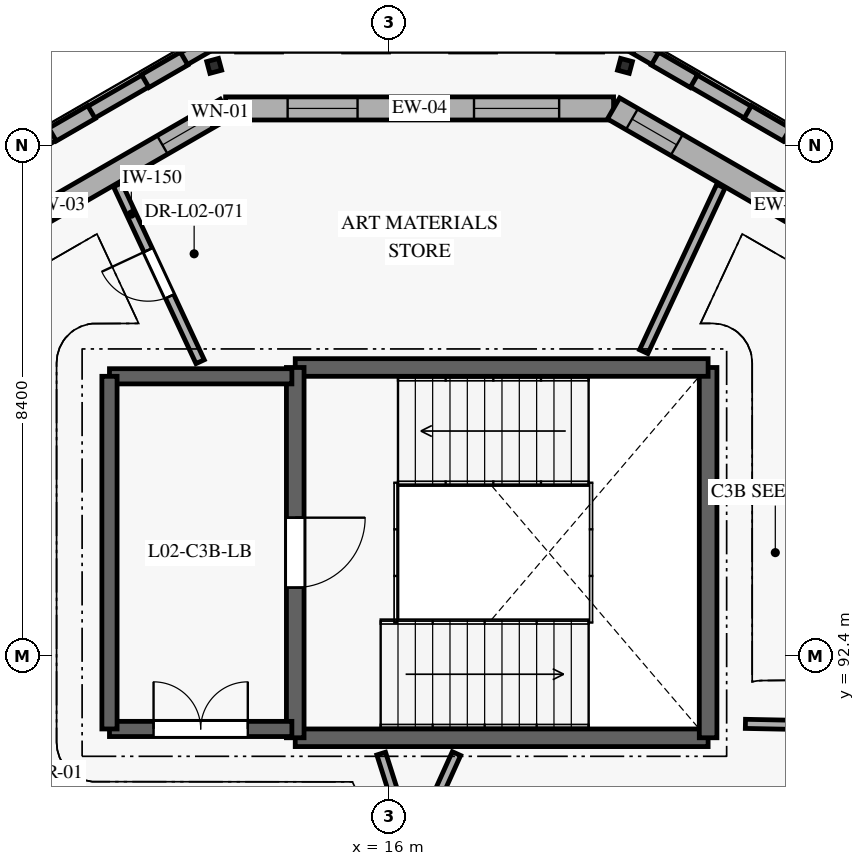
"""IFC4 building model, lengths in metres.
Left out: names, types, materials, properties, quantities, classifications, styles, units other than length and angle.
Written with IfcOpenShell. Run it as: python <this file> out.ifc"""

import sys

from ifc_helpers import new_model, si_unit, direction, frame, frame_2d, origin, origin_2d, place, context, subcontext, project, spatial, rectangle, hollow_rectangle, extrude, element, fill, save


model = new_model("IFC4")
c1 = context("Model", 3, precision=1e-05, world=origin(), true_north=direction((0.0, 1.0)))
c2 = subcontext(c1, "Body", "Model", "MODEL_VIEW")
j1 = project(units=[si_unit("LENGTHUNIT", "METRE"), si_unit("PLANEANGLEUNIT", "RADIAN")], contexts=[c1])
p1 = place(None, origin())
s1 = spatial("IfcSite", under=j1, at=p1, CompositionType="ELEMENT")
p2 = place(p1, origin())
s2 = spatial("IfcBuilding", under=s1, at=p2, CompositionType="ELEMENT")
p3 = place(p2, frame((0.0, 0.0, 8.4)))
s3 = spatial("IfcBuildingStorey", under=s2, at=p3, CompositionType="ELEMENT", Elevation=8.4)
for number, where, z_axis, x_axis in (
    (1, (19.878, 102.105, 0.0), (0.0, 0.0, 1.0), (-0.966, 0.259, 0.0)),
    (2, (13.122, 102.105, 0.0), (0.0, 0.0, 1.0), (-0.966, -0.259, 0.0)),
):
    element("IfcColumn", number, at=place(p3, frame(where, z_axis=z_axis, x_axis=x_axis)), inside=s3, PredefinedType="COLUMN", context=c2, shape_type="SweptSolid", body=[
        extrude(hollow_rectangle(XDim=0.2, YDim=0.2, WallThickness=0.012, InnerFilletRadius=0.012, OuterFilletRadius=0.019, at=origin_2d()), origin(), (0.0, 0.0, 1.0), 4.2),
    ])
p4 = place(p3, frame((7.784, 98.216, 0.0), z_axis=(0.0, 0.0, 1.0), x_axis=(0.866044766488, 0.499966461314, 0.0)))
e3 = element("IfcWall", 3, at=p4, inside=s3, PredefinedType="SOLIDWALL", context=c2, shape_type="SweptSolid", body=[
    extrude(rectangle(XDim=6.38, YDim=0.35, at=frame_2d((3.19, 0.0))), origin(), (0.0, 0.0, 1.0), 3.94),
])
p5 = place(p4, frame((0.47, 0.0, 0.85)))
e4 = element("IfcOpeningElement", 4, at=p5, cuts=e3, PredefinedType="OPENING", context=c2, shape_type="SweptSolid", body=[
    extrude(rectangle(XDim=2.25, YDim=1.3, at=frame_2d((1.125, 0.65))), frame((0.0, 0.185, 0.0), z_axis=(0.0, -1.0, 0.0), x_axis=(1.0, 0.0, 0.0)), (0.0, 0.0, 1.0), 0.37),
])
p6 = place(p4, frame((5.18, 0.0, 0.85)))
e5 = element("IfcOpeningElement", 5, at=p6, cuts=e3, PredefinedType="OPENING", context=c2, shape_type="SweptSolid", body=[
    extrude(rectangle(XDim=0.85, YDim=1.4, at=frame_2d((0.425, 0.7))), frame((0.0, 0.185, 0.0), z_axis=(0.0, -1.0, 0.0), x_axis=(1.0, 0.0, 0.0)), (0.0, 0.0, 1.0), 0.37),
])
p7 = place(p3, frame((13.31, 101.406, 0.0), z_axis=(0.0, 0.0, 1.0), x_axis=(1.0, 0.0, 0.0)))
e6 = element("IfcWall", 6, at=p7, inside=s3, PredefinedType="SOLIDWALL", context=c2, shape_type="SweptSolid", body=[
    extrude(rectangle(XDim=6.38, YDim=0.38, at=frame_2d((3.19, 0.0))), origin(), (0.0, 0.0, 1.0), 3.94),
])
p8 = place(p7, frame((1.02, 0.0, 0.85)))
e7 = element("IfcOpeningElement", 7, at=p8, cuts=e6, PredefinedType="OPENING", context=c2, shape_type="SweptSolid", body=[
    extrude(rectangle(XDim=1.15, YDim=1.5, at=frame_2d((0.575, 0.75))), frame((0.0, 0.2, 0.0), z_axis=(0.0, -1.0, 0.0), x_axis=(1.0, 0.0, 0.0)), (0.0, 0.0, 1.0), 0.4),
])
p9 = place(p7, frame((4.085, 0.0, 0.85)))
e8 = element("IfcOpeningElement", 8, at=p9, cuts=e6, PredefinedType="OPENING", context=c2, shape_type="SweptSolid", body=[
    extrude(rectangle(XDim=1.4, YDim=1.5, at=frame_2d((0.7, 0.75))), frame((0.0, 0.2, 0.0), z_axis=(0.0, -1.0, 0.0), x_axis=(1.0, 0.0, 0.0)), (0.0, 0.0, 1.0), 0.4),
])
p10 = place(p3, frame((19.69, 101.406, 0.0), z_axis=(0.0, 0.0, 1.0), x_axis=(0.866044766488, -0.499966461314, 0.0)))
e9 = element("IfcWall", 9, at=p10, inside=s3, PredefinedType="SOLIDWALL", context=c2, shape_type="SweptSolid", body=[
    extrude(rectangle(XDim=6.38, YDim=0.4, at=frame_2d((3.19, 0.0))), origin(), (0.0, 0.0, 1.0), 3.94),
])
p11 = place(p10, frame((0.35, 0.0, 0.85)))
e10 = element("IfcOpeningElement", 10, at=p11, cuts=e9, PredefinedType="OPENING", context=c2, shape_type="SweptSolid", body=[
    extrude(rectangle(XDim=0.85, YDim=1.4, at=frame_2d((0.425, 0.7))), frame((0.0, 0.21, 0.0), z_axis=(0.0, -1.0, 0.0), x_axis=(1.0, 0.0, 0.0)), (0.0, 0.0, 1.0), 0.42),
])
p12 = place(p10, frame((3.835, 0.0, 0.85)))
e11 = element("IfcOpeningElement", 11, at=p12, cuts=e9, PredefinedType="OPENING", context=c2, shape_type="SweptSolid", body=[
    extrude(rectangle(XDim=1.9, YDim=1.5, at=frame_2d((0.95, 0.75))), frame((0.0, 0.21, 0.0), z_axis=(0.0, -1.0, 0.0), x_axis=(1.0, 0.0, 0.0)), (0.0, 0.0, 1.0), 0.42),
])
p13 = place(p3, frame((26.027, 98.961, 0.0), z_axis=(0.0, 0.0, 1.0), x_axis=(-0.866019260715, 0.500010639957, 0.0)))
e12 = element("IfcWall", 12, at=p13, inside=s3, PredefinedType="ELEMENTEDWALL", context=c2, shape_type="SweptSolid", body=[
    extrude(rectangle(XDim=7.04, YDim=0.225, at=frame_2d((3.52, 0.0))), origin(), (0.0, 0.0, 1.0), 1.09),
])
p14 = place(p3, frame((22.536, 100.976, 1.09), z_axis=(0.0, 0.0, 1.0), x_axis=(-0.866059033742, 0.499941746681, 0.0)))
e13 = element("IfcWall", 13, at=p14, inside=s3, PredefinedType="ELEMENTEDWALL", context=c2, shape_type="SweptSolid", body=[
    extrude(rectangle(XDim=0.739, YDim=0.245, at=frame_2d((0.369, 0.0))), origin(), (0.0, 0.0, 1.0), 2.85),
])
p15 = place(p3, frame((21.012, 101.856, 1.09), z_axis=(0.0, 0.0, 1.0), x_axis=(-0.865915952323, 0.500189527592, 0.0)))
e14 = element("IfcWall", 14, at=p15, inside=s3, PredefinedType="ELEMENTEDWALL", context=c2, shape_type="SweptSolid", body=[
    extrude(rectangle(XDim=0.739, YDim=0.245, at=frame_2d((0.37, 0.0))), origin(), (0.0, 0.0, 1.0), 2.85),
])
p16 = place(p3, frame((13.07, 102.481, 0.0), z_axis=(0.0, 0.0, 1.0), x_axis=(-0.866019260715, -0.500010639957, 0.0)))
e15 = element("IfcWall", 15, at=p16, inside=s3, PredefinedType="ELEMENTEDWALL", context=c2, shape_type="SweptSolid", body=[
    extrude(rectangle(XDim=7.04, YDim=0.225, at=frame_2d((3.52, 0.0))), origin(), (0.0, 0.0, 1.0), 1.09),
])
p17 = place(p3, frame((12.628, 102.226, 1.09), z_axis=(0.0, 0.0, 1.0), x_axis=(-0.865915952323, -0.500189527592, 0.0)))
e16 = element("IfcWall", 16, at=p17, inside=s3, PredefinedType="ELEMENTEDWALL", context=c2, shape_type="SweptSolid", body=[
    extrude(rectangle(XDim=0.739, YDim=0.245, at=frame_2d((0.37, 0.0))), origin(), (0.0, 0.0, 1.0), 2.85),
])
p18 = place(p3, frame((11.104, 101.345, 1.09), z_axis=(0.0, 0.0, 1.0), x_axis=(-0.866059033742, -0.499941746681, 0.0)))
e17 = element("IfcWall", 17, at=p18, inside=s3, PredefinedType="ELEMENTEDWALL", context=c2, shape_type="SweptSolid", body=[
    extrude(rectangle(XDim=0.739, YDim=0.245, at=frame_2d((0.369, 0.0))), origin(), (0.0, 0.0, 1.0), 2.85),
])
p19 = place(p3, frame((14.455, 91.055, 0.0), z_axis=(0.0, 0.0, 1.0), x_axis=(1.0, 0.0, 0.0)))
e18 = element("IfcWall", 18, at=p19, inside=s3, PredefinedType="SHEAR", context=c2, shape_type="SweptSolid", body=[
    extrude(rectangle(XDim=6.79, YDim=0.29, at=frame_2d((3.395, 0.0))), origin(), (0.0, 0.0, 1.0), 3.95),
])
p20 = place(p3, frame((21.245, 91.055, 0.0), z_axis=(0.0, 0.0, 1.0), x_axis=(0.0, 1.0, 0.0)))
e19 = element("IfcWall", 19, at=p20, inside=s3, PredefinedType="SHEAR", context=c2, shape_type="SweptSolid", body=[
    extrude(rectangle(XDim=6.09, YDim=0.29, at=frame_2d((3.045, 0.0))), origin(), (0.0, 0.0, 1.0), 3.95),
])
p21 = place(p3, frame((21.245, 97.145, 0.0), z_axis=(0.0, 0.0, 1.0), x_axis=(-1.0, 0.0, 0.0)))
e20 = element("IfcWall", 20, at=p21, inside=s3, PredefinedType="SHEAR", context=c2, shape_type="SweptSolid", body=[
    extrude(rectangle(XDim=6.79, YDim=0.29, at=frame_2d((3.395, 0.0))), origin(), (0.0, 0.0, 1.0), 3.95),
])
p22 = place(p3, frame((14.455, 97.145, 0.0), z_axis=(0.0, 0.0, 1.0), x_axis=(0.0, -1.0, 0.0)))
e21 = element("IfcWall", 21, at=p22, inside=s3, PredefinedType="SHEAR", context=c2, shape_type="SweptSolid", body=[
    extrude(rectangle(XDim=6.09, YDim=0.29, at=frame_2d((3.045, 0.0))), origin(), (0.0, 0.0, 1.0), 3.95),
])
p23 = place(p22, frame((2.47, 0.0, 0.0)))
e22 = element("IfcOpeningElement", 22, at=p23, cuts=e21, PredefinedType="OPENING", context=c2, shape_type="SweptSolid", body=[
    extrude(rectangle(XDim=1.15, YDim=2.1, at=frame_2d((0.575, 1.05))), frame((0.0, 0.155, 0.0), z_axis=(0.0, -1.0, 0.0), x_axis=(1.0, 0.0, 0.0)), (0.0, 0.0, 1.0), 0.31),
])
p24 = place(p3, frame((11.4, 91.2, 0.0), z_axis=(0.0, 0.0, 1.0), x_axis=(1.0, 0.0, 0.0)))
e23 = element("IfcWall", 23, at=p24, inside=s3, PredefinedType="SHEAR", context=c2, shape_type="SweptSolid", body=[
    extrude(rectangle(XDim=3.0, YDim=0.25, at=frame_2d((1.5, 0.0))), origin(), (0.0, 0.0, 1.0), 3.95),
])
p25 = place(p24, frame((0.725, 0.0, 0.0)))
e24 = element("IfcOpeningElement", 24, at=p25, cuts=e23, PredefinedType="OPENING", context=c2, shape_type="SweptSolid", body=[
    extrude(rectangle(XDim=1.55, YDim=2.15, at=frame_2d((0.775, 1.075))), frame((0.0, 0.135, 0.0), z_axis=(0.0, -1.0, 0.0), x_axis=(1.0, 0.0, 0.0)), (0.0, 0.0, 1.0), 0.27),
])
p26 = place(p3, frame((14.4, 97.0, 0.0), z_axis=(0.0, 0.0, 1.0), x_axis=(-1.0, 0.0, 0.0)))
e25 = element("IfcWall", 25, at=p26, inside=s3, PredefinedType="SHEAR", context=c2, shape_type="SweptSolid", body=[
    extrude(rectangle(XDim=3.0, YDim=0.25, at=frame_2d((1.5, 0.0))), origin(), (0.0, 0.0, 1.0), 3.95),
])
p27 = place(p3, frame((11.4, 97.0, 0.0), z_axis=(0.0, 0.0, 1.0), x_axis=(0.0, -1.0, 0.0)))
e26 = element("IfcWall", 26, at=p27, inside=s3, PredefinedType="SHEAR", context=c2, shape_type="SweptSolid", body=[
    extrude(rectangle(XDim=5.8, YDim=0.25, at=frame_2d((2.9, 0.0))), origin(), (0.0, 0.0, 1.0), 3.95),
])
p28 = place(p3, frame((16.311, 89.405, 0.0), z_axis=(0.0, 0.0, 1.0), x_axis=(-0.302989456207, 0.95299390839, 0.0)))
e27 = element("IfcWall", 27, at=p28, inside=s3, PredefinedType="PARTITIONING", context=c2, shape_type="SweptSolid", body=[
    extrude(rectangle(XDim=1.458, YDim=0.15, at=frame_2d((0.729, 0.0))), origin(), (0.0, 0.0, 1.0), 3.93),
])
p29 = place(p3, frame((12.891, 97.24, 0.0), z_axis=(0.0, 0.0, 1.0), x_axis=(-0.422652323872, 0.906291902825, 0.0)))
e28 = element("IfcWall", 28, at=p29, inside=s3, PredefinedType="PARTITIONING", context=c2, shape_type="SweptSolid", body=[
    extrude(rectangle(XDim=3.21, YDim=0.15, at=frame_2d((1.605, 0.0))), origin(), (0.0, 0.0, 1.0), 3.93),
])
p30 = place(p29, frame((1.185, 0.0, 0.0)))
e29 = element("IfcOpeningElement", 29, at=p30, cuts=e28, PredefinedType="OPENING", context=c2, shape_type="SweptSolid", body=[
    extrude(rectangle(XDim=0.84, YDim=2.04, at=frame_2d((0.42, 1.02))), frame((0.0, 0.085, 0.0), z_axis=(0.0, -1.0, 0.0), x_axis=(1.0, 0.0, 0.0)), (0.0, 0.0, 1.0), 0.17),
])
p31 = place(p3, frame((17.107, 90.795, 0.0), z_axis=(0.0, 0.0, 1.0), x_axis=(-0.411553805923, -0.911385464461, 0.0)))
e30 = element("IfcWall", 30, at=p31, inside=s3, PredefinedType="PARTITIONING", context=c2, shape_type="SweptSolid", body=[
    extrude(rectangle(XDim=1.391, YDim=0.15, at=frame_2d((0.696, 0.0))), origin(), (0.0, 0.0, 1.0), 3.93),
])
p32 = place(p3, frame((21.859, 91.284, 0.0), z_axis=(0.0, 0.0, 1.0), x_axis=(0.999803630326, -0.019816679508, 0.0)))
e31 = element("IfcWall", 31, at=p32, inside=s3, PredefinedType="PARTITIONING", context=c2, shape_type="SweptSolid", body=[
    extrude(rectangle(XDim=1.17, YDim=0.15, at=frame_2d((0.585, 0.0))), origin(), (0.0, 0.0, 1.0), 3.93),
])
p33 = place(p3, frame((21.455, 100.127, 0.0), z_axis=(0.0, 0.0, 1.0), x_axis=(-0.422560563191, -0.906334690076, 0.0)))
e32 = element("IfcWall", 32, at=p33, inside=s3, PredefinedType="PARTITIONING", context=c2, shape_type="SweptSolid", body=[
    extrude(rectangle(XDim=3.003, YDim=0.15, at=frame_2d((1.501, 0.0))), origin(), (0.0, 0.0, 1.0), 3.93),
])
p34 = place(p6, origin())
e33 = element("IfcWindow", 33, at=p34, inside=s3, PartitioningType="SINGLE_PANEL", PredefinedType="WINDOW", context=c2, shape_type="SweptSolid", body=[
    extrude(rectangle(XDim=0.85, YDim=1.4, at=frame_2d((0.425, 0.7))), frame((0.0, 0.03, 0.0), z_axis=(0.0, -1.0, 0.0), x_axis=(1.0, 0.0, 0.0)), (0.0, 0.0, 1.0), 0.06),
])
fill(e5, e33)
p35 = place(p8, origin())
e34 = element("IfcWindow", 34, at=p35, inside=s3, PartitioningType="SINGLE_PANEL", PredefinedType="WINDOW", context=c2, shape_type="SweptSolid", body=[
    extrude(rectangle(XDim=1.15, YDim=1.5, at=frame_2d((0.575, 0.75))), frame((0.0, 0.03, 0.0), z_axis=(0.0, -1.0, 0.0), x_axis=(1.0, 0.0, 0.0)), (0.0, 0.0, 1.0), 0.06),
])
fill(e7, e34)
p36 = place(p9, origin())
e35 = element("IfcWindow", 35, at=p36, inside=s3, PartitioningType="SINGLE_PANEL", PredefinedType="WINDOW", context=c2, shape_type="SweptSolid", body=[
    extrude(rectangle(XDim=1.4, YDim=1.5, at=frame_2d((0.7, 0.75))), frame((0.0, 0.03, 0.0), z_axis=(0.0, -1.0, 0.0), x_axis=(1.0, 0.0, 0.0)), (0.0, 0.0, 1.0), 0.06),
])
fill(e8, e35)
p37 = place(p11, origin())
e36 = element("IfcWindow", 36, at=p37, inside=s3, PartitioningType="SINGLE_PANEL", PredefinedType="WINDOW", context=c2, shape_type="SweptSolid", body=[
    extrude(rectangle(XDim=0.85, YDim=1.4, at=frame_2d((0.425, 0.7))), frame((0.0, 0.03, 0.0), z_axis=(0.0, -1.0, 0.0), x_axis=(1.0, 0.0, 0.0)), (0.0, 0.0, 1.0), 0.06),
])
fill(e10, e36)
p38 = place(p23, origin())
e37 = element("IfcDoor", 37, at=p38, inside=s3, OperationType="SINGLE_SWING_LEFT", PredefinedType="DOOR", context=c2, shape_type="SweptSolid", body=[
    extrude(rectangle(XDim=1.15, YDim=2.1, at=frame_2d((0.575, 1.05))), frame((0.0, 0.025, 0.0), z_axis=(0.0, -1.0, 0.0), x_axis=(1.0, 0.0, 0.0)), (0.0, 0.0, 1.0), 0.05),
])
fill(e22, e37)
p39 = place(p25, origin())
e38 = element("IfcDoor", 38, at=p39, inside=s3, OperationType="DOUBLE_DOOR_SINGLE_SWING", PredefinedType="DOOR", context=c2, shape_type="SweptSolid", body=[
    extrude(rectangle(XDim=1.55, YDim=2.15, at=frame_2d((0.775, 1.075))), frame((0.0, 0.025, 0.0), z_axis=(0.0, -1.0, 0.0), x_axis=(1.0, 0.0, 0.0)), (0.0, 0.0, 1.0), 0.05),
])
fill(e24, e38)
p40 = place(p30, frame((0.84, 0.0, 0.0), z_axis=(0.0, 0.0, 1.0), x_axis=(-1.0, 0.0, 0.0)))
e39 = element("IfcDoor", 39, at=p40, inside=s3, OperationType="SINGLE_SWING_RIGHT", PredefinedType="DOOR", context=c2, shape_type="SweptSolid", body=[
    extrude(rectangle(XDim=0.84, YDim=2.04, at=frame_2d((0.42, 1.02))), frame((0.0, 0.025, 0.0), z_axis=(0.0, -1.0, 0.0), x_axis=(1.0, 0.0, 0.0)), (0.0, 0.0, 1.0), 0.05),
])
fill(e29, e39)
save(model, sys.argv[1])
